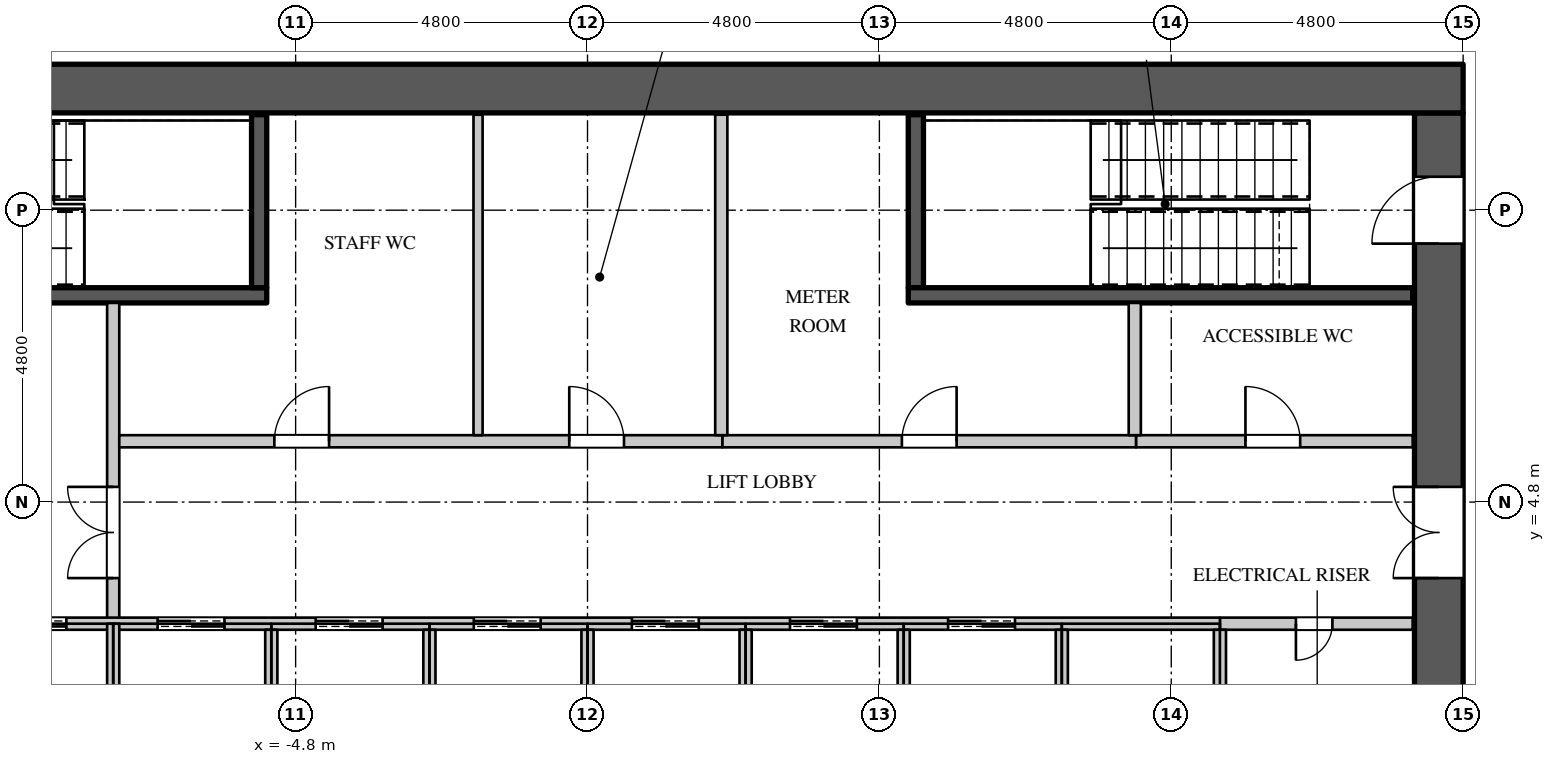
"""IFC4 building model, lengths in metres.
Left out: names, types, materials, properties, quantities, classifications, styles, units other than length and angle.
Written with IfcOpenShell. Run it as: python <this file> out.ifc"""

import sys

from ifc_helpers import new_model, si_unit, direction, frame, frame_2d, origin, place, context, subcontext, project, spatial, rectangle, extrude, element, fill, save


model = new_model("IFC4")
c1 = context("Model", 3, precision=1e-05, world=origin(), true_north=direction((0.0, 1.0)))
c2 = subcontext(c1, "Body", "Model", "MODEL_VIEW")
j1 = project(units=[si_unit("LENGTHUNIT", "METRE"), si_unit("PLANEANGLEUNIT", "RADIAN")], contexts=[c1])
p1 = place(None, origin())
s1 = spatial("IfcSite", under=j1, at=p1, CompositionType="ELEMENT")
p2 = place(p1, origin())
s2 = spatial("IfcBuilding", under=s1, at=p2, CompositionType="ELEMENT")
p3 = place(p2, frame((0.0, 0.0, 110.7)))
s3 = spatial("IfcBuildingStorey", under=s2, at=p3, CompositionType="ELEMENT", Elevation=110.7)
p4 = place(p3, frame((-14.4, 11.6, 0.0), z_axis=(0.0, 0.0, 1.0), x_axis=(1.0, 0.0, 0.0)))
e1 = element("IfcWall", 1, at=p4, inside=s3, PredefinedType="SHEAR", context=c2, shape_type="SweptSolid", body=[
    extrude(rectangle(XDim=28.8, YDim=0.8, at=frame_2d((14.4, 0.0))), origin(), (0.0, 0.0, 1.0), 4.2),
])
p5 = place(p3, frame((14.0, -11.2, 0.0), z_axis=(0.0, 0.0, 1.0), x_axis=(0.0, 1.0, 0.0)))
e2 = element("IfcWall", 2, at=p5, inside=s3, PredefinedType="SHEAR", context=c2, shape_type="SweptSolid", body=[
    extrude(rectangle(XDim=22.4, YDim=0.8, at=frame_2d((11.2, 0.0))), origin(), (0.0, 0.0, 1.0), 4.2),
])
p6 = place(p5, frame((20.25, 0.0, 0.0)))
e3 = element("IfcOpeningElement", 3, at=p6, cuts=e2, PredefinedType="OPENING", context=c2, shape_type="SweptSolid", body=[
    extrude(rectangle(XDim=1.1, YDim=2.2, at=frame_2d((0.55, 1.1))), frame((0.0, 0.41, 0.0), z_axis=(0.0, -1.0, 0.0), x_axis=(1.0, 0.0, 0.0)), (0.0, 0.0, 1.0), 0.82),
])
p7 = place(p5, frame((1.05, 0.0, 0.0)))
e4 = element("IfcOpeningElement", 4, at=p7, cuts=e2, PredefinedType="OPENING", context=c2, shape_type="SweptSolid", body=[
    extrude(rectangle(XDim=1.1, YDim=2.2, at=frame_2d((0.55, 1.1))), frame((0.0, 0.41, 0.0), z_axis=(0.0, -1.0, 0.0), x_axis=(1.0, 0.0, 0.0)), (0.0, 0.0, 1.0), 0.82),
])
p8 = place(p5, frame((14.75, 0.0, 0.0)))
e5 = element("IfcOpeningElement", 5, at=p8, cuts=e2, PredefinedType="OPENING", context=c2, shape_type="SweptSolid", body=[
    extrude(rectangle(XDim=1.5, YDim=2.4, at=frame_2d((0.75, 1.2))), frame((0.0, 0.41, 0.0), z_axis=(0.0, -1.0, 0.0), x_axis=(1.0, 0.0, 0.0)), (0.0, 0.0, 1.0), 0.82),
])
p9 = place(p5, frame((6.15, 0.0, 0.0)))
e6 = element("IfcOpeningElement", 6, at=p9, cuts=e2, PredefinedType="OPENING", context=c2, shape_type="SweptSolid", body=[
    extrude(rectangle(XDim=1.5, YDim=2.4, at=frame_2d((0.75, 1.2))), frame((0.0, 0.41, 0.0), z_axis=(0.0, -1.0, 0.0), x_axis=(1.0, 0.0, 0.0)), (0.0, 0.0, 1.0), 0.82),
])
p10 = place(p3, frame((-7.8, 2.8, 0.0), z_axis=(0.0, 0.0, 1.0), x_axis=(0.0, 1.0, 0.0)))
e7 = element("IfcWall", 7, at=p10, inside=s3, PredefinedType="PARTITIONING", context=c2, shape_type="SweptSolid", body=[
    extrude(rectangle(XDim=5.275, YDim=0.2, at=frame_2d((2.637, 0.0))), origin(), (0.0, 0.0, 1.0), 3.95),
])
p11 = place(p10, frame((0.75, 0.0, 0.0)))
e8 = element("IfcOpeningElement", 8, at=p11, cuts=e7, PredefinedType="OPENING", context=c2, shape_type="SweptSolid", body=[
    extrude(rectangle(XDim=1.5, YDim=2.4, at=frame_2d((0.75, 1.2))), frame((0.0, 0.11, 0.0), z_axis=(0.0, -1.0, 0.0), x_axis=(1.0, 0.0, 0.0)), (0.0, 0.0, 1.0), 0.22),
])
p12 = place(p3, frame((-7.7, 5.8, 0.0), z_axis=(0.0, 0.0, 1.0), x_axis=(1.0, 0.0, 0.0)))
e9 = element("IfcWall", 9, at=p12, inside=s3, PredefinedType="PARTITIONING", context=c2, shape_type="SweptSolid", body=[
    extrude(rectangle(XDim=9.92, YDim=0.2, at=frame_2d((4.96, 0.0))), origin(), (0.0, 0.0, 1.0), 3.95),
])
p13 = place(p12, frame((2.55, 0.0, 0.0)))
e10 = element("IfcOpeningElement", 10, at=p13, cuts=e9, PredefinedType="OPENING", context=c2, shape_type="SweptSolid", body=[
    extrude(rectangle(XDim=0.9, YDim=2.2, at=frame_2d((0.45, 1.1))), frame((0.0, 0.11, 0.0), z_axis=(0.0, -1.0, 0.0), x_axis=(1.0, 0.0, 0.0)), (0.0, 0.0, 1.0), 0.22),
])
p14 = place(p12, frame((7.4, 0.0, 0.0)))
e11 = element("IfcOpeningElement", 11, at=p14, cuts=e9, PredefinedType="OPENING", context=c2, shape_type="SweptSolid", body=[
    extrude(rectangle(XDim=0.9, YDim=2.2, at=frame_2d((0.45, 1.1))), frame((0.0, 0.11, 0.0), z_axis=(0.0, -1.0, 0.0), x_axis=(1.0, 0.0, 0.0)), (0.0, 0.0, 1.0), 0.22),
])
p15 = place(p3, frame((9.02, 5.8, 0.0), z_axis=(0.0, 0.0, 1.0), x_axis=(1.0, 0.0, 0.0)))
e12 = element("IfcWall", 12, at=p15, inside=s3, PredefinedType="PARTITIONING", context=c2, shape_type="SweptSolid", body=[
    extrude(rectangle(XDim=4.55, YDim=0.2, at=frame_2d((2.275, 0.0))), origin(), (0.0, 0.0, 1.0), 3.95),
])
p16 = place(p15, frame((1.8, 0.0, 0.0)))
e13 = element("IfcOpeningElement", 13, at=p16, cuts=e12, PredefinedType="OPENING", context=c2, shape_type="SweptSolid", body=[
    extrude(rectangle(XDim=0.9, YDim=2.2, at=frame_2d((0.45, 1.1))), frame((0.0, 0.11, 0.0), z_axis=(0.0, -1.0, 0.0), x_axis=(1.0, 0.0, 0.0)), (0.0, 0.0, 1.0), 0.22),
])
p17 = place(p3, frame((-1.8, 5.9, 0.0), z_axis=(0.0, 0.0, 1.0), x_axis=(0.0, 1.0, 0.0)))
e14 = element("IfcWall", 14, at=p17, inside=s3, PredefinedType="PARTITIONING", context=c2, shape_type="SweptSolid", body=[
    extrude(rectangle(XDim=5.27, YDim=0.15, at=frame_2d((2.635, 0.0))), origin(), (0.0, 0.0, 1.0), 3.95),
])
p18 = place(p3, frame((2.22, 5.8, 0.0), z_axis=(0.0, 0.0, 1.0), x_axis=(1.0, 0.0, 0.0)))
e15 = element("IfcWall", 15, at=p18, inside=s3, PredefinedType="PARTITIONING", context=c2, shape_type="SweptSolid", body=[
    extrude(rectangle(XDim=6.8, YDim=0.2, at=frame_2d((3.4, 0.0))), origin(), (0.0, 0.0, 1.0), 3.95),
])
p19 = place(p18, frame((2.95, 0.0, 0.0)))
e16 = element("IfcOpeningElement", 16, at=p19, cuts=e15, PredefinedType="OPENING", context=c2, shape_type="SweptSolid", body=[
    extrude(rectangle(XDim=0.9, YDim=2.2, at=frame_2d((0.45, 1.1))), frame((0.0, 0.11, 0.0), z_axis=(0.0, -1.0, 0.0), x_axis=(1.0, 0.0, 0.0)), (0.0, 0.0, 1.0), 0.22),
])
p20 = place(p3, frame((2.2, 5.9, 0.0), z_axis=(0.0, 0.0, 1.0), x_axis=(0.0, 1.0, 0.0)))
e17 = element("IfcWall", 17, at=p20, inside=s3, PredefinedType="PARTITIONING", context=c2, shape_type="SweptSolid", body=[
    extrude(rectangle(XDim=5.27, YDim=0.2, at=frame_2d((2.635, 0.0))), origin(), (0.0, 0.0, 1.0), 3.95),
])
p21 = place(p3, frame((9.0, 5.9, 0.0), z_axis=(0.0, 0.0, 1.0), x_axis=(0.0, 1.0, 0.0)))
e18 = element("IfcWall", 18, at=p21, inside=s3, PredefinedType="PARTITIONING", context=c2, shape_type="SweptSolid", body=[
    extrude(rectangle(XDim=2.175, YDim=0.2, at=frame_2d((1.087, 0.0))), origin(), (0.0, 0.0, 1.0), 3.95),
])
p22 = place(p3, frame((10.4, 2.8, 0.0), z_axis=(0.0, 0.0, 1.0), x_axis=(1.0, 0.0, 0.0)))
e19 = element("IfcWall", 19, at=p22, inside=s3, PredefinedType="PARTITIONING", context=c2, shape_type="SweptSolid", body=[
    extrude(rectangle(XDim=3.17, YDim=0.2, at=frame_2d((1.585, 0.0))), origin(), (0.0, 0.0, 1.0), 3.95),
])
p23 = place(p22, frame((1.25, 0.0, 0.0)))
e20 = element("IfcOpeningElement", 20, at=p23, cuts=e19, PredefinedType="OPENING", context=c2, shape_type="SweptSolid", body=[
    extrude(rectangle(XDim=0.6, YDim=2.0, at=frame_2d((0.3, 1.0))), frame((0.0, 0.11, 0.0), z_axis=(0.0, -1.0, 0.0), x_axis=(1.0, 0.0, 0.0)), (0.0, 0.0, 1.0), 0.22),
])
p24 = place(p3, frame((-13.57, 2.8, 0.0), z_axis=(0.0, 0.0, 1.0), x_axis=(1.0, 0.0, 0.0)))
e21 = element("IfcWall", 21, at=p24, inside=s3, PredefinedType="PARTITIONING", context=c2, shape_type="SweptSolid", body=[
    extrude(rectangle(XDim=23.97, YDim=0.2, at=frame_2d((11.985, 0.0))), origin(), (0.0, 0.0, 1.0), 3.95),
])
p25 = place(p24, frame((1.0, 0.0, 0.0)))
e22 = element("IfcOpeningElement", 22, at=p25, cuts=e21, PredefinedType="OPENING", context=c2, shape_type="SweptSolid", body=[
    extrude(rectangle(XDim=1.1, YDim=2.2, at=frame_2d((0.55, 1.1))), frame((0.0, 0.11, 0.0), z_axis=(0.0, -1.0, 0.0), x_axis=(1.0, 0.0, 0.0)), (0.0, 0.0, 1.0), 0.22),
])
p26 = place(p24, frame((3.9, 0.0, 0.0)))
e23 = element("IfcOpeningElement", 23, at=p26, cuts=e21, PredefinedType="OPENING", context=c2, shape_type="SweptSolid", body=[
    extrude(rectangle(XDim=1.1, YDim=2.2, at=frame_2d((0.55, 1.1))), frame((0.0, 0.11, 0.0), z_axis=(0.0, -1.0, 0.0), x_axis=(1.0, 0.0, 0.0)), (0.0, 0.0, 1.0), 0.22),
])
p27 = place(p24, frame((6.5, 0.0, 0.0)))
e24 = element("IfcOpeningElement", 24, at=p27, cuts=e21, PredefinedType="OPENING", context=c2, shape_type="SweptSolid", body=[
    extrude(rectangle(XDim=1.1, YDim=2.2, at=frame_2d((0.55, 1.1))), frame((0.0, 0.11, 0.0), z_axis=(0.0, -1.0, 0.0), x_axis=(1.0, 0.0, 0.0)), (0.0, 0.0, 1.0), 0.22),
])
p28 = place(p24, frame((9.1, 0.0, 0.0)))
e25 = element("IfcOpeningElement", 25, at=p28, cuts=e21, PredefinedType="OPENING", context=c2, shape_type="SweptSolid", body=[
    extrude(rectangle(XDim=1.1, YDim=2.2, at=frame_2d((0.55, 1.1))), frame((0.0, 0.11, 0.0), z_axis=(0.0, -1.0, 0.0), x_axis=(1.0, 0.0, 0.0)), (0.0, 0.0, 1.0), 0.22),
])
p29 = place(p24, frame((11.7, 0.0, 0.0)))
e26 = element("IfcOpeningElement", 26, at=p29, cuts=e21, PredefinedType="OPENING", context=c2, shape_type="SweptSolid", body=[
    extrude(rectangle(XDim=1.1, YDim=2.2, at=frame_2d((0.55, 1.1))), frame((0.0, 0.11, 0.0), z_axis=(0.0, -1.0, 0.0), x_axis=(1.0, 0.0, 0.0)), (0.0, 0.0, 1.0), 0.22),
])
p30 = place(p24, frame((14.3, 0.0, 0.0)))
e27 = element("IfcOpeningElement", 27, at=p30, cuts=e21, PredefinedType="OPENING", context=c2, shape_type="SweptSolid", body=[
    extrude(rectangle(XDim=1.1, YDim=2.2, at=frame_2d((0.55, 1.1))), frame((0.0, 0.11, 0.0), z_axis=(0.0, -1.0, 0.0), x_axis=(1.0, 0.0, 0.0)), (0.0, 0.0, 1.0), 0.22),
])
p31 = place(p24, frame((16.9, 0.0, 0.0)))
e28 = element("IfcOpeningElement", 28, at=p31, cuts=e21, PredefinedType="OPENING", context=c2, shape_type="SweptSolid", body=[
    extrude(rectangle(XDim=1.1, YDim=2.2, at=frame_2d((0.55, 1.1))), frame((0.0, 0.11, 0.0), z_axis=(0.0, -1.0, 0.0), x_axis=(1.0, 0.0, 0.0)), (0.0, 0.0, 1.0), 0.22),
])
p32 = place(p24, frame((19.5, 0.0, 0.0)))
e29 = element("IfcOpeningElement", 29, at=p32, cuts=e21, PredefinedType="OPENING", context=c2, shape_type="SweptSolid", body=[
    extrude(rectangle(XDim=1.1, YDim=2.2, at=frame_2d((0.55, 1.1))), frame((0.0, 0.11, 0.0), z_axis=(0.0, -1.0, 0.0), x_axis=(1.0, 0.0, 0.0)), (0.0, 0.0, 1.0), 0.22),
])
p33 = place(p3, frame((-7.8, 0.0, 0.0), z_axis=(0.0, 0.0, 1.0), x_axis=(0.0, 1.0, 0.0)))
e30 = element("IfcWall", 30, at=p33, inside=s3, PredefinedType="PARTITIONING", context=c2, shape_type="SweptSolid", body=[
    extrude(rectangle(XDim=2.8, YDim=0.2, at=frame_2d((1.4, 0.0))), origin(), (0.0, 0.0, 1.0), 3.95),
])
for number, where, z_axis, x_axis in (
    (31, (-5.2, 0.1, 0.0), (0.0, 0.0, 1.0), (0.0, 1.0, 0.0)),
    (32, (-2.6, 0.1, 0.0), (0.0, 0.0, 1.0), (0.0, 1.0, 0.0)),
    (33, (0.0, 0.1, 0.0), (0.0, 0.0, 1.0), (0.0, 1.0, 0.0)),
    (34, (2.6, 0.1, 0.0), (0.0, 0.0, 1.0), (0.0, 1.0, 0.0)),
    (35, (5.2, 0.1, 0.0), (0.0, 0.0, 1.0), (0.0, 1.0, 0.0)),
):
    element("IfcWall", number, at=place(p3, frame(where, z_axis=z_axis, x_axis=x_axis)), inside=s3, PredefinedType="PARTITIONING", context=c2, shape_type="SweptSolid", body=[
        extrude(rectangle(XDim=2.6, YDim=0.2, at=frame_2d((1.3, 0.0))), origin(), (0.0, 0.0, 1.0), 3.95),
    ])
p34 = place(p3, frame((7.8, 0.0, 0.0), z_axis=(0.0, 0.0, 1.0), x_axis=(0.0, 1.0, 0.0)))
e36 = element("IfcWall", 36, at=p34, inside=s3, PredefinedType="PARTITIONING", context=c2, shape_type="SweptSolid", body=[
    extrude(rectangle(XDim=2.7, YDim=0.2, at=frame_2d((1.35, 0.0))), origin(), (0.0, 0.0, 1.0), 3.95),
])
p35 = place(p3, frame((10.4, -2.7, 0.0), z_axis=(0.0, 0.0, 1.0), x_axis=(0.0, 1.0, 0.0)))
e37 = element("IfcWall", 37, at=p35, inside=s3, PredefinedType="PARTITIONING", context=c2, shape_type="SweptSolid", body=[
    extrude(rectangle(XDim=5.4, YDim=0.2, at=frame_2d((2.7, 0.0))), origin(), (0.0, 0.0, 1.0), 3.95),
])
p36 = place(p3, frame((-13.57, 8.2, 0.0), z_axis=(0.0, 0.0, 1.0), x_axis=(1.0, 0.0, 0.0)))
e38 = element("IfcWall", 38, at=p36, inside=s3, PredefinedType="SHEAR", context=c2, shape_type="SweptSolid", body=[
    extrude(rectangle(XDim=8.295, YDim=0.25, at=frame_2d((4.147, 0.0))), origin(), (0.0, 0.0, 1.0), 3.95),
])
p37 = place(p36, frame((0.15, 0.0, 0.0)))
e39 = element("IfcOpeningElement", 39, at=p37, cuts=e38, PredefinedType="OPENING", context=c2, shape_type="SweptSolid", body=[
    extrude(rectangle(XDim=1.1, YDim=2.2, at=frame_2d((0.55, 1.1))), frame((0.0, 0.135, 0.0), z_axis=(0.0, -1.0, 0.0), x_axis=(1.0, 0.0, 0.0)), (0.0, 0.0, 1.0), 0.27),
])
for number, where, z_axis, x_axis in (
    (40, (-5.4, 8.325, 0.0), (0.0, 0.0, 1.0), (0.0, 1.0, 0.0)),
    (41, (5.4, 8.325, 0.0), (0.0, 0.0, 1.0), (0.0, 1.0, 0.0)),
):
    element("IfcWall", number, at=place(p3, frame(where, z_axis=z_axis, x_axis=x_axis)), inside=s3, PredefinedType="SHEAR", context=c2, shape_type="SweptSolid", body=[
        extrude(rectangle(XDim=2.845, YDim=0.25, at=frame_2d((1.422, 0.0))), origin(), (0.0, 0.0, 1.0), 3.95),
    ])
p38 = place(p3, frame((5.275, 8.2, 0.0), z_axis=(0.0, 0.0, 1.0), x_axis=(1.0, 0.0, 0.0)))
e42 = element("IfcWall", 42, at=p38, inside=s3, PredefinedType="SHEAR", context=c2, shape_type="SweptSolid", body=[
    extrude(rectangle(XDim=8.295, YDim=0.25, at=frame_2d((4.147, 0.0))), origin(), (0.0, 0.0, 1.0), 3.95),
])
p39 = place(p23, origin())
e43 = element("IfcDoor", 43, at=p39, inside=s3, OperationType="SINGLE_SWING_RIGHT", PredefinedType="DOOR", context=c2, shape_type="SweptSolid", body=[
    extrude(rectangle(XDim=0.6, YDim=2.0, at=frame_2d((0.3, 1.0))), frame((0.0, 0.025, 0.0), z_axis=(0.0, -1.0, 0.0), x_axis=(1.0, 0.0, 0.0)), (0.0, 0.0, 1.0), 0.05),
])
fill(e20, e43)
p40 = place(p13, origin())
e44 = element("IfcDoor", 44, at=p40, inside=s3, OperationType="SINGLE_SWING_RIGHT", PredefinedType="DOOR", context=c2, shape_type="SweptSolid", body=[
    extrude(rectangle(XDim=0.9, YDim=2.2, at=frame_2d((0.45, 1.1))), frame((0.0, 0.025, 0.0), z_axis=(0.0, -1.0, 0.0), x_axis=(1.0, 0.0, 0.0)), (0.0, 0.0, 1.0), 0.05),
])
fill(e10, e44)
p41 = place(p14, origin())
e45 = element("IfcDoor", 45, at=p41, inside=s3, OperationType="SINGLE_SWING_LEFT", PredefinedType="DOOR", context=c2, shape_type="SweptSolid", body=[
    extrude(rectangle(XDim=0.9, YDim=2.2, at=frame_2d((0.45, 1.1))), frame((0.0, 0.025, 0.0), z_axis=(0.0, -1.0, 0.0), x_axis=(1.0, 0.0, 0.0)), (0.0, 0.0, 1.0), 0.05),
])
fill(e11, e45)
p42 = place(p19, origin())
e46 = element("IfcDoor", 46, at=p42, inside=s3, OperationType="SINGLE_SWING_RIGHT", PredefinedType="DOOR", context=c2, shape_type="SweptSolid", body=[
    extrude(rectangle(XDim=0.9, YDim=2.2, at=frame_2d((0.45, 1.1))), frame((0.0, 0.025, 0.0), z_axis=(0.0, -1.0, 0.0), x_axis=(1.0, 0.0, 0.0)), (0.0, 0.0, 1.0), 0.05),
])
fill(e16, e46)
p43 = place(p16, origin())
e47 = element("IfcDoor", 47, at=p43, inside=s3, OperationType="SINGLE_SWING_LEFT", PredefinedType="DOOR", context=c2, shape_type="SweptSolid", body=[
    extrude(rectangle(XDim=0.9, YDim=2.2, at=frame_2d((0.45, 1.1))), frame((0.0, 0.025, 0.0), z_axis=(0.0, -1.0, 0.0), x_axis=(1.0, 0.0, 0.0)), (0.0, 0.0, 1.0), 0.05),
])
fill(e13, e47)
p44 = place(p26, origin())
e48 = element("IfcDoor", 48, at=p44, inside=s3, OperationType="DOUBLE_DOOR_SLIDING", PredefinedType="DOOR", context=c2, shape_type="SweptSolid", body=[
    extrude(rectangle(XDim=1.1, YDim=2.2, at=frame_2d((0.55, 1.1))), frame((0.0, 0.025, 0.0), z_axis=(0.0, -1.0, 0.0), x_axis=(1.0, 0.0, 0.0)), (0.0, 0.0, 1.0), 0.05),
])
fill(e23, e48)
p45 = place(p27, origin())
e49 = element("IfcDoor", 49, at=p45, inside=s3, OperationType="DOUBLE_DOOR_SLIDING", PredefinedType="DOOR", context=c2, shape_type="SweptSolid", body=[
    extrude(rectangle(XDim=1.1, YDim=2.2, at=frame_2d((0.55, 1.1))), frame((0.0, 0.025, 0.0), z_axis=(0.0, -1.0, 0.0), x_axis=(1.0, 0.0, 0.0)), (0.0, 0.0, 1.0), 0.05),
])
fill(e24, e49)
p46 = place(p28, origin())
e50 = element("IfcDoor", 50, at=p46, inside=s3, OperationType="DOUBLE_DOOR_SLIDING", PredefinedType="DOOR", context=c2, shape_type="SweptSolid", body=[
    extrude(rectangle(XDim=1.1, YDim=2.2, at=frame_2d((0.55, 1.1))), frame((0.0, 0.025, 0.0), z_axis=(0.0, -1.0, 0.0), x_axis=(1.0, 0.0, 0.0)), (0.0, 0.0, 1.0), 0.05),
])
fill(e25, e50)
p47 = place(p29, origin())
e51 = element("IfcDoor", 51, at=p47, inside=s3, OperationType="DOUBLE_DOOR_SLIDING", PredefinedType="DOOR", context=c2, shape_type="SweptSolid", body=[
    extrude(rectangle(XDim=1.1, YDim=2.2, at=frame_2d((0.55, 1.1))), frame((0.0, 0.025, 0.0), z_axis=(0.0, -1.0, 0.0), x_axis=(1.0, 0.0, 0.0)), (0.0, 0.0, 1.0), 0.05),
])
fill(e26, e51)
p48 = place(p30, origin())
e52 = element("IfcDoor", 52, at=p48, inside=s3, OperationType="DOUBLE_DOOR_SLIDING", PredefinedType="DOOR", context=c2, shape_type="SweptSolid", body=[
    extrude(rectangle(XDim=1.1, YDim=2.2, at=frame_2d((0.55, 1.1))), frame((0.0, 0.025, 0.0), z_axis=(0.0, -1.0, 0.0), x_axis=(1.0, 0.0, 0.0)), (0.0, 0.0, 1.0), 0.05),
])
fill(e27, e52)
p49 = place(p31, origin())
e53 = element("IfcDoor", 53, at=p49, inside=s3, OperationType="DOUBLE_DOOR_SLIDING", PredefinedType="DOOR", context=c2, shape_type="SweptSolid", body=[
    extrude(rectangle(XDim=1.1, YDim=2.2, at=frame_2d((0.55, 1.1))), frame((0.0, 0.025, 0.0), z_axis=(0.0, -1.0, 0.0), x_axis=(1.0, 0.0, 0.0)), (0.0, 0.0, 1.0), 0.05),
])
fill(e28, e53)
p50 = place(p32, origin())
e54 = element("IfcDoor", 54, at=p50, inside=s3, OperationType="DOUBLE_DOOR_SLIDING", PredefinedType="DOOR", context=c2, shape_type="SweptSolid", body=[
    extrude(rectangle(XDim=1.1, YDim=2.2, at=frame_2d((0.55, 1.1))), frame((0.0, 0.025, 0.0), z_axis=(0.0, -1.0, 0.0), x_axis=(1.0, 0.0, 0.0)), (0.0, 0.0, 1.0), 0.05),
])
fill(e29, e54)
p51 = place(p11, origin())
e55 = element("IfcDoor", 55, at=p51, inside=s3, OperationType="DOUBLE_DOOR_SINGLE_SWING", PredefinedType="DOOR", context=c2, shape_type="SweptSolid", body=[
    extrude(rectangle(XDim=1.5, YDim=2.4, at=frame_2d((0.75, 1.2))), frame((0.0, 0.025, 0.0), z_axis=(0.0, -1.0, 0.0), x_axis=(1.0, 0.0, 0.0)), (0.0, 0.0, 1.0), 0.05),
])
fill(e8, e55)
p52 = place(p6, origin())
e56 = element("IfcDoor", 56, at=p52, inside=s3, OperationType="SINGLE_SWING_LEFT", PredefinedType="DOOR", context=c2, shape_type="SweptSolid", body=[
    extrude(rectangle(XDim=1.1, YDim=2.2, at=frame_2d((0.55, 1.1))), frame((0.0, 0.395, 0.0), z_axis=(0.0, -1.0, 0.0), x_axis=(1.0, 0.0, 0.0)), (0.0, 0.0, 1.0), 0.05),
])
fill(e3, e56)
p53 = place(p8, origin())
e57 = element("IfcDoor", 57, at=p53, inside=s3, OperationType="DOUBLE_DOOR_SINGLE_SWING", PredefinedType="DOOR", context=c2, shape_type="SweptSolid", body=[
    extrude(rectangle(XDim=1.5, YDim=2.4, at=frame_2d((0.75, 1.2))), frame((0.0, 0.395, 0.0), z_axis=(0.0, -1.0, 0.0), x_axis=(1.0, 0.0, 0.0)), (0.0, 0.0, 1.0), 0.05),
])
fill(e5, e57)
save(model, sys.argv[1])
